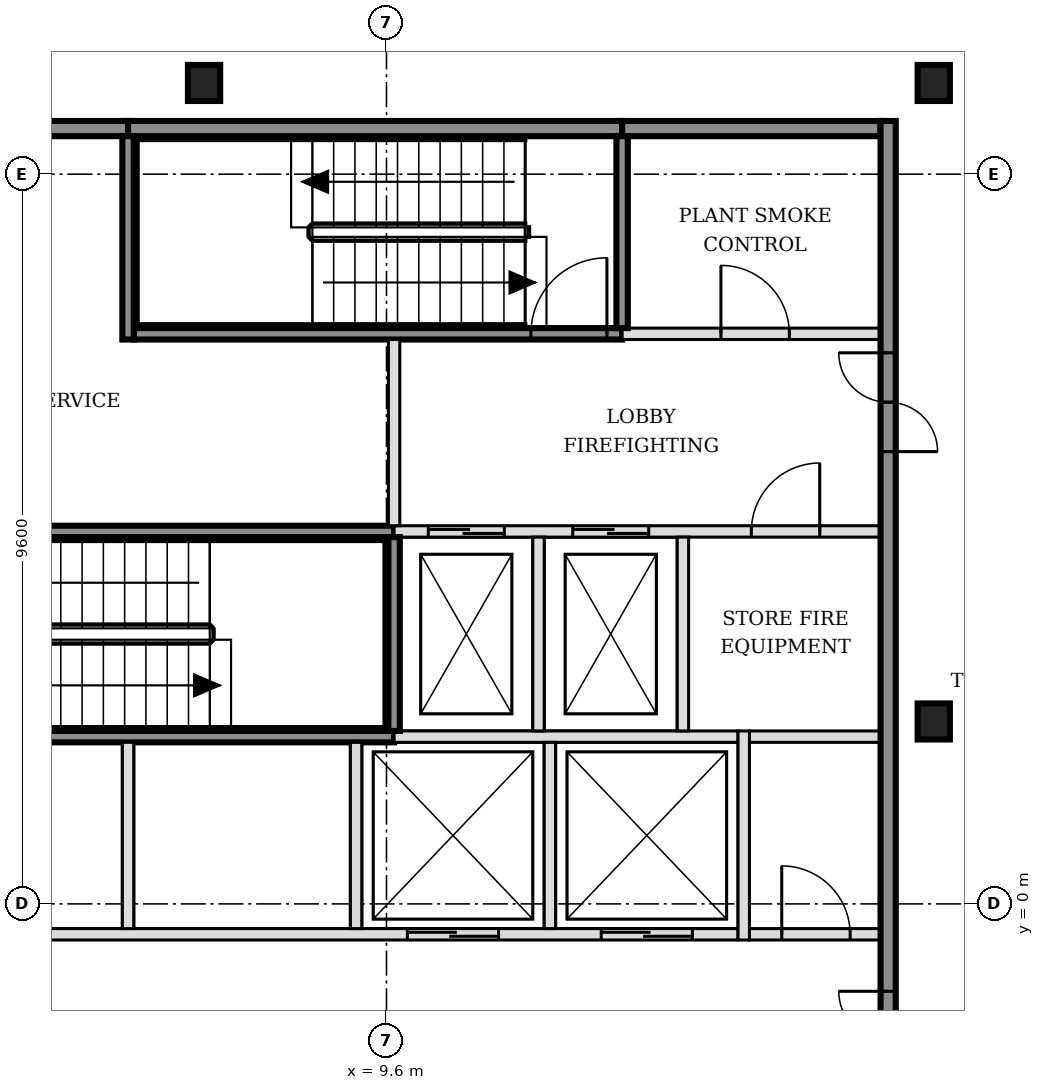
"""IFC4 building model, lengths in metres.
Left out: names, types, materials, properties, quantities, classifications, styles, units other than length and angle.
Written with IfcOpenShell. Run it as: python <this file> out.ifc"""

import sys

from ifc_helpers import new_model, si_unit, direction, frame, frame_2d, origin, origin_2d, place, context, subcontext, project, spatial, rectangle, i_section, extrude, element, fill, save


model = new_model("IFC4")
c1 = context("Model", 3, precision=1e-05, world=origin(), true_north=direction((0.0, 1.0)))
c2 = subcontext(c1, "Body", "Model", "MODEL_VIEW")
j1 = project(units=[si_unit("LENGTHUNIT", "METRE"), si_unit("PLANEANGLEUNIT", "RADIAN")], contexts=[c1])
p1 = place(None, origin())
s1 = spatial("IfcSite", under=j1, at=p1, CompositionType="ELEMENT")
p2 = place(p1, origin())
s2 = spatial("IfcBuilding", under=s1, at=p2, CompositionType="ELEMENT")
p3 = place(p2, frame((0.0, 0.0, 105.0)))
s3 = spatial("IfcBuildingStorey", under=s2, at=p3, CompositionType="ELEMENT", Elevation=105.0)
for number, where, z_axis, x_axis in (
    (1, (16.8, 2.4, -0.15), (0.0, 0.0, 1.0), (1.0, 0.0, 0.0)),
    (2, (7.2, 10.8, -0.15), (0.0, 0.0, 1.0), (1.0, 0.0, 0.0)),
    (3, (16.8, 10.8, -0.15), (0.0, 0.0, 1.0), (1.0, 0.0, 0.0)),
):
    element("IfcColumn", number, at=place(p3, frame(where, z_axis=z_axis, x_axis=x_axis)), inside=s3, PredefinedType="COLUMN", context=c2, shape_type="SweptSolid", body=[
        extrude(i_section(OverallWidth=0.424, OverallDepth=0.474, WebThickness=0.048, FlangeThickness=0.077, FilletRadius=0.015, at=origin_2d()), origin(), (0.0, 0.0, 1.0), 3.6),
    ])
p4 = place(p3, frame((-1.7, -0.4, 0.0), z_axis=(0.0, 0.0, 1.0), x_axis=(1.0, 0.0, 0.0)))
e4 = element("IfcWall", 4, at=p4, inside=s3, PredefinedType="SOLIDWALL", context=c2, shape_type="SweptSolid", body=[
    extrude(rectangle(XDim=15.925, YDim=0.15, at=frame_2d((7.962, 0.0))), origin(), (0.0, 0.0, 1.0), 3.45),
])
p5 = place(p4, frame((0.6, 0.0, 0.0)))
e5 = element("IfcOpeningElement", 5, at=p5, cuts=e4, PredefinedType="OPENING", context=c2, shape_type="SweptSolid", body=[
    extrude(rectangle(XDim=1.1, YDim=2.1, at=frame_2d((0.55, 1.05))), frame((0.0, 0.085, 0.0), z_axis=(0.0, -1.0, 0.0), x_axis=(1.0, 0.0, 0.0)), (0.0, 0.0, 1.0), 0.17),
])
p6 = place(p4, frame((3.1, 0.0, 0.0)))
e6 = element("IfcOpeningElement", 6, at=p6, cuts=e4, PredefinedType="OPENING", context=c2, shape_type="SweptSolid", body=[
    extrude(rectangle(XDim=1.1, YDim=2.1, at=frame_2d((0.55, 1.05))), frame((0.0, 0.085, 0.0), z_axis=(0.0, -1.0, 0.0), x_axis=(1.0, 0.0, 0.0)), (0.0, 0.0, 1.0), 0.17),
])
p7 = place(p4, frame((11.575, 0.0, 0.0)))
e7 = element("IfcOpeningElement", 7, at=p7, cuts=e4, PredefinedType="OPENING", context=c2, shape_type="SweptSolid", body=[
    extrude(rectangle(XDim=1.2, YDim=2.1, at=frame_2d((0.6, 1.05))), frame((0.0, 0.085, 0.0), z_axis=(0.0, -1.0, 0.0), x_axis=(1.0, 0.0, 0.0)), (0.0, 0.0, 1.0), 0.17),
])
p8 = place(p4, frame((14.125, 0.0, 0.0)))
e8 = element("IfcOpeningElement", 8, at=p8, cuts=e4, PredefinedType="OPENING", context=c2, shape_type="SweptSolid", body=[
    extrude(rectangle(XDim=1.2, YDim=2.1, at=frame_2d((0.6, 1.05))), frame((0.0, 0.085, 0.0), z_axis=(0.0, -1.0, 0.0), x_axis=(1.0, 0.0, 0.0)), (0.0, 0.0, 1.0), 0.17),
])
p9 = place(p3, frame((14.375, -0.4, 0.0), z_axis=(0.0, 0.0, 1.0), x_axis=(1.0, 0.0, 0.0)))
e9 = element("IfcWall", 9, at=p9, inside=s3, PredefinedType="PARTITIONING", context=c2, shape_type="SweptSolid", body=[
    extrude(rectangle(XDim=1.725, YDim=0.15, at=frame_2d((0.863, 0.0))), origin(), (0.0, 0.0, 1.0), 3.45),
])
p10 = place(p9, frame((0.425, 0.0, 0.0)))
e10 = element("IfcOpeningElement", 10, at=p10, cuts=e9, PredefinedType="OPENING", context=c2, shape_type="SweptSolid", body=[
    extrude(rectangle(XDim=0.9, YDim=2.1, at=frame_2d((0.45, 1.05))), frame((0.0, 0.085, 0.0), z_axis=(0.0, -1.0, 0.0), x_axis=(1.0, 0.0, 0.0)), (0.0, 0.0, 1.0), 0.17),
])
p11 = place(p3, frame((3.2, 2.2, 0.0), z_axis=(0.0, 0.0, 1.0), x_axis=(1.0, 0.0, 0.0)))
e11 = element("IfcWall", 11, at=p11, inside=s3, PredefinedType="SOLIDWALL", context=c2, shape_type="SweptSolid", body=[
    extrude(rectangle(XDim=6.5, YDim=0.15, at=frame_2d((3.25, 0.0))), origin(), (0.0, 0.0, 1.0), 3.45),
])
p12 = place(p3, frame((9.7, 2.2, 0.0), z_axis=(0.0, 0.0, 1.0), x_axis=(1.0, 0.0, 0.0)))
e12 = element("IfcWall", 12, at=p12, inside=s3, PredefinedType="SOLIDWALL", context=c2, shape_type="SweptSolid", body=[
    extrude(rectangle(XDim=4.525, YDim=0.15, at=frame_2d((2.263, 0.0))), origin(), (0.0, 0.0, 1.0), 3.45),
])
p13 = place(p3, frame((14.375, 2.2, 0.0), z_axis=(0.0, 0.0, 1.0), x_axis=(1.0, 0.0, 0.0)))
e13 = element("IfcWall", 13, at=p13, inside=s3, PredefinedType="PARTITIONING", context=c2, shape_type="SweptSolid", body=[
    extrude(rectangle(XDim=1.725, YDim=0.15, at=frame_2d((0.863, 0.0))), origin(), (0.0, 0.0, 1.0), 3.45),
])
p14 = place(p3, frame((3.275, 4.9, 0.0), z_axis=(0.0, 0.0, 1.0), x_axis=(1.0, 0.0, 0.0)))
e14 = element("IfcWall", 14, at=p14, inside=s3, PredefinedType="SOLIDWALL", context=c2, shape_type="SweptSolid", body=[
    extrude(rectangle(XDim=6.425, YDim=0.15, at=frame_2d((3.212, 0.0))), origin(), (0.0, 0.0, 1.0), 3.45),
])
p15 = place(p14, frame((0.1, 0.0, 0.0)))
e15 = element("IfcOpeningElement", 15, at=p15, cuts=e14, PredefinedType="OPENING", context=c2, shape_type="SweptSolid", body=[
    extrude(rectangle(XDim=1.0, YDim=2.1, at=frame_2d((0.5, 1.05))), frame((0.0, 0.085, 0.0), z_axis=(0.0, -1.0, 0.0), x_axis=(1.0, 0.0, 0.0)), (0.0, 0.0, 1.0), 0.17),
])
p16 = place(p3, frame((9.7, 4.9, 0.0), z_axis=(0.0, 0.0, 1.0), x_axis=(1.0, 0.0, 0.0)))
e16 = element("IfcWall", 16, at=p16, inside=s3, PredefinedType="SOLIDWALL", context=c2, shape_type="SweptSolid", body=[
    extrude(rectangle(XDim=6.4, YDim=0.15, at=frame_2d((3.2, 0.0))), origin(), (0.0, 0.0, 1.0), 3.45),
])
p17 = place(p16, frame((0.45, 0.0, 0.0)))
e17 = element("IfcOpeningElement", 17, at=p17, cuts=e16, PredefinedType="OPENING", context=c2, shape_type="SweptSolid", body=[
    extrude(rectangle(XDim=1.0, YDim=2.1, at=frame_2d((0.5, 1.05))), frame((0.0, 0.085, 0.0), z_axis=(0.0, -1.0, 0.0), x_axis=(1.0, 0.0, 0.0)), (0.0, 0.0, 1.0), 0.17),
])
p18 = place(p16, frame((2.35, 0.0, 0.0)))
e18 = element("IfcOpeningElement", 18, at=p18, cuts=e16, PredefinedType="OPENING", context=c2, shape_type="SweptSolid", body=[
    extrude(rectangle(XDim=1.0, YDim=2.1, at=frame_2d((0.5, 1.05))), frame((0.0, 0.085, 0.0), z_axis=(0.0, -1.0, 0.0), x_axis=(1.0, 0.0, 0.0)), (0.0, 0.0, 1.0), 0.17),
])
p19 = place(p16, frame((4.7, 0.0, 0.0)))
e19 = element("IfcOpeningElement", 19, at=p19, cuts=e16, PredefinedType="OPENING", context=c2, shape_type="SweptSolid", body=[
    extrude(rectangle(XDim=0.9, YDim=2.1, at=frame_2d((0.45, 1.05))), frame((0.0, 0.085, 0.0), z_axis=(0.0, -1.0, 0.0), x_axis=(1.0, 0.0, 0.0)), (0.0, 0.0, 1.0), 0.17),
])
p20 = place(p3, frame((6.275, 7.5, 0.0), z_axis=(0.0, 0.0, 1.0), x_axis=(1.0, 0.0, 0.0)))
e20 = element("IfcWall", 20, at=p20, inside=s3, PredefinedType="SOLIDWALL", context=c2, shape_type="SweptSolid", body=[
    extrude(rectangle(XDim=6.425, YDim=0.15, at=frame_2d((3.212, 0.0))), origin(), (0.0, 0.0, 1.0), 3.45),
])
p21 = place(p20, frame((5.225, 0.0, 0.0)))
e21 = element("IfcOpeningElement", 21, at=p21, cuts=e20, PredefinedType="OPENING", context=c2, shape_type="SweptSolid", body=[
    extrude(rectangle(XDim=1.0, YDim=2.1, at=frame_2d((0.5, 1.05))), frame((0.0, 0.085, 0.0), z_axis=(0.0, -1.0, 0.0), x_axis=(1.0, 0.0, 0.0)), (0.0, 0.0, 1.0), 0.17),
])
p22 = place(p3, frame((12.7, 7.5, 0.0), z_axis=(0.0, 0.0, 1.0), x_axis=(1.0, 0.0, 0.0)))
e22 = element("IfcWall", 22, at=p22, inside=s3, PredefinedType="SOLIDWALL", context=c2, shape_type="SweptSolid", body=[
    extrude(rectangle(XDim=3.4, YDim=0.15, at=frame_2d((1.7, 0.0))), origin(), (0.0, 0.0, 1.0), 3.45),
])
p23 = place(p22, frame((1.3, 0.0, 0.0)))
e23 = element("IfcOpeningElement", 23, at=p23, cuts=e22, PredefinedType="OPENING", context=c2, shape_type="SweptSolid", body=[
    extrude(rectangle(XDim=0.9, YDim=2.1, at=frame_2d((0.45, 1.05))), frame((0.0, 0.085, 0.0), z_axis=(0.0, -1.0, 0.0), x_axis=(1.0, 0.0, 0.0)), (0.0, 0.0, 1.0), 0.17),
])
p24 = place(p3, frame((-1.7, 10.2, 0.0), z_axis=(0.0, 0.0, 1.0), x_axis=(1.0, 0.0, 0.0)))
e24 = element("IfcWall", 24, at=p24, inside=s3, PredefinedType="SOLIDWALL", context=c2, shape_type="SweptSolid", body=[
    extrude(rectangle(XDim=7.9, YDim=0.2, at=frame_2d((3.95, 0.0))), origin(), (0.0, 0.0, 1.0), 3.45),
])
p25 = place(p3, frame((6.2, 10.2, 0.0), z_axis=(0.0, 0.0, 1.0), x_axis=(1.0, 0.0, 0.0)))
e25 = element("IfcWall", 25, at=p25, inside=s3, PredefinedType="SOLIDWALL", context=c2, shape_type="SweptSolid", body=[
    extrude(rectangle(XDim=6.5, YDim=0.2, at=frame_2d((3.25, 0.0))), origin(), (0.0, 0.0, 1.0), 3.45),
])
p26 = place(p3, frame((12.7, 10.2, 0.0), z_axis=(0.0, 0.0, 1.0), x_axis=(1.0, 0.0, 0.0)))
e26 = element("IfcWall", 26, at=p26, inside=s3, PredefinedType="SOLIDWALL", context=c2, shape_type="SweptSolid", body=[
    extrude(rectangle(XDim=3.4, YDim=0.2, at=frame_2d((1.7, 0.0))), origin(), (0.0, 0.0, 1.0), 3.45),
])
p27 = place(p3, frame((6.2, -0.325, 0.0), z_axis=(0.0, 0.0, 1.0), x_axis=(0.0, 1.0, 0.0)))
e27 = element("IfcWall", 27, at=p27, inside=s3, PredefinedType="SOLIDWALL", context=c2, shape_type="SweptSolid", body=[
    extrude(rectangle(XDim=2.45, YDim=0.15, at=frame_2d((1.225, 0.0))), origin(), (0.0, 0.0, 1.0), 3.45),
])
p28 = place(p3, frame((6.2, 7.425, 0.0), z_axis=(0.0, 0.0, 1.0), x_axis=(0.0, 1.0, 0.0)))
e28 = element("IfcWall", 28, at=p28, inside=s3, PredefinedType="SOLIDWALL", context=c2, shape_type="SweptSolid", body=[
    extrude(rectangle(XDim=2.675, YDim=0.15, at=frame_2d((1.337, 0.0))), origin(), (0.0, 0.0, 1.0), 3.45),
])
p29 = place(p3, frame((9.2, -0.325, 0.0), z_axis=(0.0, 0.0, 1.0), x_axis=(0.0, 1.0, 0.0)))
e29 = element("IfcWall", 29, at=p29, inside=s3, PredefinedType="SOLIDWALL", context=c2, shape_type="SweptSolid", body=[
    extrude(rectangle(XDim=2.45, YDim=0.15, at=frame_2d((1.225, 0.0))), origin(), (0.0, 0.0, 1.0), 3.45),
])
p30 = place(p3, frame((9.7, 2.275, 0.0), z_axis=(0.0, 0.0, 1.0), x_axis=(0.0, 1.0, 0.0)))
e30 = element("IfcWall", 30, at=p30, inside=s3, PredefinedType="SOLIDWALL", context=c2, shape_type="SweptSolid", body=[
    extrude(rectangle(XDim=2.55, YDim=0.15, at=frame_2d((1.275, 0.0))), origin(), (0.0, 0.0, 1.0), 3.45),
])
p31 = place(p3, frame((9.7, 4.975, 0.0), z_axis=(0.0, 0.0, 1.0), x_axis=(0.0, 1.0, 0.0)))
e31 = element("IfcWall", 31, at=p31, inside=s3, PredefinedType="SOLIDWALL", context=c2, shape_type="SweptSolid", body=[
    extrude(rectangle(XDim=2.45, YDim=0.15, at=frame_2d((1.225, 0.0))), origin(), (0.0, 0.0, 1.0), 3.45),
])
p32 = place(p3, frame((11.6, 2.275, 0.0), z_axis=(0.0, 0.0, 1.0), x_axis=(0.0, 1.0, 0.0)))
e32 = element("IfcWall", 32, at=p32, inside=s3, PredefinedType="SOLIDWALL", context=c2, shape_type="SweptSolid", body=[
    extrude(rectangle(XDim=2.55, YDim=0.15, at=frame_2d((1.275, 0.0))), origin(), (0.0, 0.0, 1.0), 3.45),
])
p33 = place(p3, frame((11.75, -0.325, 0.0), z_axis=(0.0, 0.0, 1.0), x_axis=(0.0, 1.0, 0.0)))
e33 = element("IfcWall", 33, at=p33, inside=s3, PredefinedType="SOLIDWALL", context=c2, shape_type="SweptSolid", body=[
    extrude(rectangle(XDim=2.45, YDim=0.15, at=frame_2d((1.225, 0.0))), origin(), (0.0, 0.0, 1.0), 3.45),
])
p34 = place(p3, frame((12.7, 7.575, 0.0), z_axis=(0.0, 0.0, 1.0), x_axis=(0.0, 1.0, 0.0)))
e34 = element("IfcWall", 34, at=p34, inside=s3, PredefinedType="SOLIDWALL", context=c2, shape_type="SweptSolid", body=[
    extrude(rectangle(XDim=2.525, YDim=0.15, at=frame_2d((1.263, 0.0))), origin(), (0.0, 0.0, 1.0), 3.45),
])
p35 = place(p3, frame((13.5, 2.275, 0.0), z_axis=(0.0, 0.0, 1.0), x_axis=(0.0, 1.0, 0.0)))
e35 = element("IfcWall", 35, at=p35, inside=s3, PredefinedType="SOLIDWALL", context=c2, shape_type="SweptSolid", body=[
    extrude(rectangle(XDim=2.55, YDim=0.15, at=frame_2d((1.275, 0.0))), origin(), (0.0, 0.0, 1.0), 3.45),
])
p36 = place(p3, frame((14.3, -0.475, 0.0), z_axis=(0.0, 0.0, 1.0), x_axis=(0.0, 1.0, 0.0)))
e36 = element("IfcWall", 36, at=p36, inside=s3, PredefinedType="SOLIDWALL", context=c2, shape_type="SweptSolid", body=[
    extrude(rectangle(XDim=2.75, YDim=0.15, at=frame_2d((1.375, 0.0))), origin(), (0.0, 0.0, 1.0), 3.45),
])
p37 = place(p3, frame((16.2, -5.5, 0.0), z_axis=(0.0, 0.0, 1.0), x_axis=(0.0, 1.0, 0.0)))
e37 = element("IfcWall", 37, at=p37, inside=s3, PredefinedType="SOLIDWALL", context=c2, shape_type="SweptSolid", body=[
    extrude(rectangle(XDim=15.8, YDim=0.2, at=frame_2d((7.9, 0.0))), origin(), (0.0, 0.0, 1.0), 3.45),
])
p38 = place(p37, frame((3.05, 0.0, 0.0)))
e38 = element("IfcOpeningElement", 38, at=p38, cuts=e37, PredefinedType="OPENING", context=c2, shape_type="SweptSolid", body=[
    extrude(rectangle(XDim=1.3, YDim=2.1, at=frame_2d((0.65, 1.05))), frame((0.0, 0.11, 0.0), z_axis=(0.0, -1.0, 0.0), x_axis=(1.0, 0.0, 0.0)), (0.0, 0.0, 1.0), 0.22),
])
p39 = place(p37, frame((11.45, 0.0, 0.0)))
e39 = element("IfcOpeningElement", 39, at=p39, cuts=e37, PredefinedType="OPENING", context=c2, shape_type="SweptSolid", body=[
    extrude(rectangle(XDim=1.3, YDim=2.1, at=frame_2d((0.65, 1.05))), frame((0.0, 0.11, 0.0), z_axis=(0.0, -1.0, 0.0), x_axis=(1.0, 0.0, 0.0)), (0.0, 0.0, 1.0), 0.22),
])
p40 = place(p7, origin())
e40 = element("IfcDoor", 40, at=p40, inside=s3, OperationType="DOUBLE_DOOR_SLIDING", PredefinedType="DOOR", context=c2, shape_type="SweptSolid", body=[
    extrude(rectangle(XDim=1.2, YDim=2.1, at=frame_2d((0.6, 1.05))), frame((0.0, 0.025, 0.0), z_axis=(0.0, -1.0, 0.0), x_axis=(1.0, 0.0, 0.0)), (0.0, 0.0, 1.0), 0.05),
])
fill(e7, e40)
p41 = place(p8, origin())
e41 = element("IfcDoor", 41, at=p41, inside=s3, OperationType="DOUBLE_DOOR_SLIDING", PredefinedType="DOOR", context=c2, shape_type="SweptSolid", body=[
    extrude(rectangle(XDim=1.2, YDim=2.1, at=frame_2d((0.6, 1.05))), frame((0.0, 0.025, 0.0), z_axis=(0.0, -1.0, 0.0), x_axis=(1.0, 0.0, 0.0)), (0.0, 0.0, 1.0), 0.05),
])
fill(e8, e41)
p42 = place(p17, origin())
e42 = element("IfcDoor", 42, at=p42, inside=s3, OperationType="DOUBLE_DOOR_SLIDING", PredefinedType="DOOR", context=c2, shape_type="SweptSolid", body=[
    extrude(rectangle(XDim=1.0, YDim=2.1, at=frame_2d((0.5, 1.05))), frame((0.0, 0.025, 0.0), z_axis=(0.0, -1.0, 0.0), x_axis=(1.0, 0.0, 0.0)), (0.0, 0.0, 1.0), 0.05),
])
fill(e17, e42)
p43 = place(p18, origin())
e43 = element("IfcDoor", 43, at=p43, inside=s3, OperationType="DOUBLE_DOOR_SLIDING", PredefinedType="DOOR", context=c2, shape_type="SweptSolid", body=[
    extrude(rectangle(XDim=1.0, YDim=2.1, at=frame_2d((0.5, 1.05))), frame((0.0, 0.025, 0.0), z_axis=(0.0, -1.0, 0.0), x_axis=(1.0, 0.0, 0.0)), (0.0, 0.0, 1.0), 0.05),
])
fill(e18, e43)
p44 = place(p21, origin())
e44 = element("IfcDoor", 44, at=p44, inside=s3, OperationType="SINGLE_SWING_RIGHT", PredefinedType="DOOR", context=c2, shape_type="SweptSolid", body=[
    extrude(rectangle(XDim=1.0, YDim=2.1, at=frame_2d((0.5, 1.05))), frame((0.0, 0.025, 0.0), z_axis=(0.0, -1.0, 0.0), x_axis=(1.0, 0.0, 0.0)), (0.0, 0.0, 1.0), 0.05),
])
fill(e21, e44)
p45 = place(p38, origin())
e45 = element("IfcDoor", 45, at=p45, inside=s3, OperationType="DOUBLE_DOOR_SINGLE_SWING", PredefinedType="DOOR", context=c2, shape_type="SweptSolid", body=[
    extrude(rectangle(XDim=1.3, YDim=2.1, at=frame_2d((0.65, 1.05))), frame((0.0, 0.025, 0.0), z_axis=(0.0, -1.0, 0.0), x_axis=(1.0, 0.0, 0.0)), (0.0, 0.0, 1.0), 0.05),
])
fill(e38, e45)
p46 = place(p39, origin())
e46 = element("IfcDoor", 46, at=p46, inside=s3, OperationType="DOUBLE_DOOR_SINGLE_SWING", PredefinedType="DOOR", context=c2, shape_type="SweptSolid", body=[
    extrude(rectangle(XDim=1.3, YDim=2.1, at=frame_2d((0.65, 1.05))), frame((0.0, 0.025, 0.0), z_axis=(0.0, -1.0, 0.0), x_axis=(1.0, 0.0, 0.0)), (0.0, 0.0, 1.0), 0.05),
])
fill(e39, e46)
p47 = place(p10, origin())
e47 = element("IfcDoor", 47, at=p47, inside=s3, OperationType="SINGLE_SWING_LEFT", PredefinedType="DOOR", context=c2, shape_type="SweptSolid", body=[
    extrude(rectangle(XDim=0.9, YDim=2.1, at=frame_2d((0.45, 1.05))), frame((0.0, 0.025, 0.0), z_axis=(0.0, -1.0, 0.0), x_axis=(1.0, 0.0, 0.0)), (0.0, 0.0, 1.0), 0.05),
])
fill(e10, e47)
p48 = place(p19, origin())
e48 = element("IfcDoor", 48, at=p48, inside=s3, OperationType="SINGLE_SWING_RIGHT", PredefinedType="DOOR", context=c2, shape_type="SweptSolid", body=[
    extrude(rectangle(XDim=0.9, YDim=2.1, at=frame_2d((0.45, 1.05))), frame((0.0, 0.025, 0.0), z_axis=(0.0, -1.0, 0.0), x_axis=(1.0, 0.0, 0.0)), (0.0, 0.0, 1.0), 0.05),
])
fill(e19, e48)
p49 = place(p23, origin())
e49 = element("IfcDoor", 49, at=p49, inside=s3, OperationType="SINGLE_SWING_LEFT", PredefinedType="DOOR", context=c2, shape_type="SweptSolid", body=[
    extrude(rectangle(XDim=0.9, YDim=2.1, at=frame_2d((0.45, 1.05))), frame((0.0, 0.025, 0.0), z_axis=(0.0, -1.0, 0.0), x_axis=(1.0, 0.0, 0.0)), (0.0, 0.0, 1.0), 0.05),
])
fill(e23, e49)
save(model, sys.argv[1])
